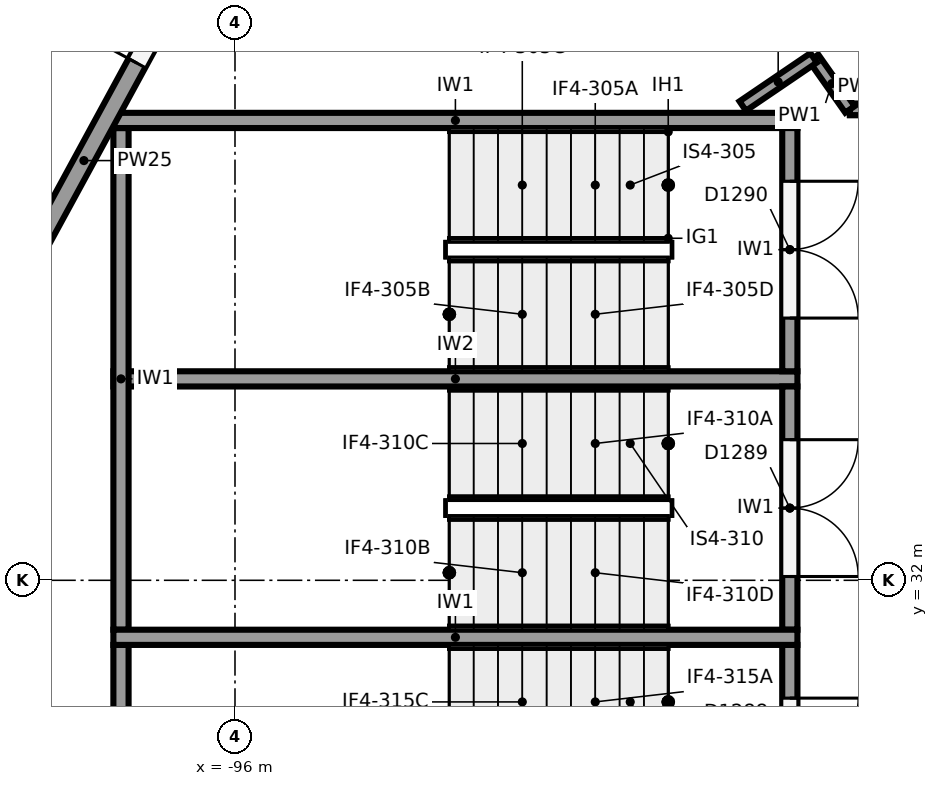
"""IFC4 building model, lengths in metres.
Left out: names, types, materials, properties, quantities, classifications, styles, units other than length and angle.
Written with IfcOpenShell. Run it as: python <this file> out.ifc"""

import sys

from ifc_helpers import new_model, si_unit, direction, frame, frame_2d, origin, place, context, subcontext, project, spatial, rectangle, extrude, element, fill, save


model = new_model("IFC4")
c1 = context("Model", 3, precision=1e-05, world=origin(), true_north=direction((0.0, 1.0)))
c2 = subcontext(c1, "Body", "Model", "MODEL_VIEW")
j1 = project(units=[si_unit("LENGTHUNIT", "METRE"), si_unit("PLANEANGLEUNIT", "RADIAN")], contexts=[c1])
p1 = place(None, origin())
s1 = spatial("IfcSite", under=j1, at=p1, CompositionType="ELEMENT")
p2 = place(p1, origin())
s2 = spatial("IfcBuilding", under=s1, at=p2, CompositionType="ELEMENT")
p3 = place(p2, frame((0.0, 0.0, 18.0)))
s3 = spatial("IfcBuildingStorey", under=s2, at=p3, CompositionType="ELEMENT", Elevation=18.0)
p4 = place(p3, frame((-101.161, 31.689, 0.0), z_axis=(0.0, 0.0, 1.0), x_axis=(0.477867771117, 0.878431780691, 0.0)))
e1 = element("IfcWall", 1, at=p4, inside=s3, PredefinedType="SOLIDWALL", context=c2, shape_type="SweptSolid", body=[
    extrude(rectangle(XDim=13.28, YDim=0.25, at=frame_2d((6.64, 0.0))), origin(), (0.0, 0.0, 1.0), 4.3),
])
p5 = place(p4, frame((11.63, 0.0, 1.0)))
e2 = element("IfcOpeningElement", 2, at=p5, cuts=e1, PredefinedType="OPENING", context=c2, shape_type="SweptSolid", body=[
    extrude(rectangle(XDim=0.9, YDim=3.25, at=frame_2d((0.45, 1.625))), frame((0.0, 0.135, 0.0), z_axis=(0.0, -1.0, 0.0), x_axis=(1.0, 0.0, 0.0)), (0.0, 0.0, 1.0), 0.27),
])
p6 = place(p4, frame((10.2, 0.0, 1.0)))
e3 = element("IfcOpeningElement", 3, at=p6, cuts=e1, PredefinedType="OPENING", context=c2, shape_type="SweptSolid", body=[
    extrude(rectangle(XDim=0.9, YDim=3.25, at=frame_2d((0.45, 1.625))), frame((0.0, 0.135, 0.0), z_axis=(0.0, -1.0, 0.0), x_axis=(1.0, 0.0, 0.0)), (0.0, 0.0, 1.0), 0.27),
])
p7 = place(p4, frame((1.13, 0.0, 1.0)))
e4 = element("IfcOpeningElement", 4, at=p7, cuts=e1, PredefinedType="OPENING", context=c2, shape_type="SweptSolid", body=[
    extrude(rectangle(XDim=0.9, YDim=3.25, at=frame_2d((0.45, 1.625))), frame((0.0, 0.135, 0.0), z_axis=(0.0, -1.0, 0.0), x_axis=(1.0, 0.0, 0.0)), (0.0, 0.0, 1.0), 0.27),
])
p8 = place(p4, frame((8.1, 0.0, 0.0)))
e5 = element("IfcOpeningElement", 5, at=p8, cuts=e1, PredefinedType="OPENING", context=c2, shape_type="SweptSolid", body=[
    extrude(rectangle(XDim=1.8, YDim=2.4, at=frame_2d((0.9, 1.2))), frame((0.0, 0.135, 0.0), z_axis=(0.0, -1.0, 0.0), x_axis=(1.0, 0.0, 0.0)), (0.0, 0.0, 1.0), 0.27),
])
p9 = place(p3, frame((-94.815, 19.145, 0.0), z_axis=(0.0, 0.0, 1.0), x_axis=(-0.477867771117, 0.878431780691, 0.0)))
e6 = element("IfcWall", 6, at=p9, inside=s3, PredefinedType="SOLIDWALL", context=c2, shape_type="SweptSolid", body=[
    extrude(rectangle(XDim=13.28, YDim=0.25, at=frame_2d((6.64, 0.0))), origin(), (0.0, 0.0, 1.0), 4.3),
])
p10 = place(p9, frame((0.75, 0.0, 1.0)))
e7 = element("IfcOpeningElement", 7, at=p10, cuts=e6, PredefinedType="OPENING", context=c2, shape_type="SweptSolid", body=[
    extrude(rectangle(XDim=0.9, YDim=3.25, at=frame_2d((0.45, 1.625))), frame((0.0, 0.135, 0.0), z_axis=(0.0, -1.0, 0.0), x_axis=(1.0, 0.0, 0.0)), (0.0, 0.0, 1.0), 0.27),
])
p11 = place(p9, frame((2.85, 0.0, 1.0)))
e8 = element("IfcOpeningElement", 8, at=p11, cuts=e6, PredefinedType="OPENING", context=c2, shape_type="SweptSolid", body=[
    extrude(rectangle(XDim=0.9, YDim=3.25, at=frame_2d((0.45, 1.625))), frame((0.0, 0.135, 0.0), z_axis=(0.0, -1.0, 0.0), x_axis=(1.0, 0.0, 0.0)), (0.0, 0.0, 1.0), 0.27),
])
p12 = place(p9, frame((11.25, 0.0, 1.0)))
e9 = element("IfcOpeningElement", 9, at=p12, cuts=e6, PredefinedType="OPENING", context=c2, shape_type="SweptSolid", body=[
    extrude(rectangle(XDim=0.9, YDim=3.25, at=frame_2d((0.45, 1.625))), frame((0.0, 0.135, 0.0), z_axis=(0.0, -1.0, 0.0), x_axis=(1.0, 0.0, 0.0)), (0.0, 0.0, 1.0), 0.27),
])
for number, where, z_axis, x_axis in (
    (10, (-97.6, 38.05, 0.0), (0.0, 0.0, 1.0), (1.0, 0.0, 0.0)),
    (11, (-97.6, 31.25, 0.0), (0.0, 0.0, 1.0), (1.0, 0.0, 0.0)),
):
    element("IfcWall", number, at=place(p3, frame(where, z_axis=z_axis, x_axis=x_axis)), inside=s3, PredefinedType="SHEAR", context=c2, shape_type="SweptSolid", body=[
        extrude(rectangle(XDim=9.0, YDim=0.2, at=frame_2d((4.5, 0.0))), origin(), (0.0, 0.0, 1.0), 5.6),
    ])
for number, where, z_axis, x_axis in (
    (12, (-97.5, 37.95, 0.0), (0.0, 0.0, 1.0), (0.0, -1.0, 0.0)),
    (13, (-97.5, 31.15, 0.0), (0.0, 0.0, 1.0), (0.0, -1.0, 0.0)),
):
    element("IfcWall", number, at=place(p3, frame(where, z_axis=z_axis, x_axis=x_axis)), inside=s3, PredefinedType="SHEAR", context=c2, shape_type="SweptSolid", body=[
        extrude(rectangle(XDim=6.6, YDim=0.2, at=frame_2d((3.3, 0.0))), origin(), (0.0, 0.0, 1.0), 5.6),
    ])
p13 = place(p3, frame((-97.6, 34.65, 0.0), z_axis=(0.0, 0.0, 1.0), x_axis=(1.0, 0.0, 0.0)))
e14 = element("IfcWall", 14, at=p13, inside=s3, PredefinedType="SHEAR", context=c2, shape_type="SweptSolid", body=[
    extrude(rectangle(XDim=9.0, YDim=0.2, at=frame_2d((4.5, 0.0))), origin(), (0.0, 0.0, 1.0), 5.6),
])
p14 = place(p3, frame((-88.7, 37.95, 0.0), z_axis=(0.0, 0.0, 1.0), x_axis=(0.0, -1.0, 0.0)))
e15 = element("IfcWall", 15, at=p14, inside=s3, PredefinedType="SHEAR", context=c2, shape_type="SweptSolid", body=[
    extrude(rectangle(XDim=3.2, YDim=0.2, at=frame_2d((1.6, 0.0))), origin(), (0.0, 0.0, 1.0), 5.6),
])
p15 = place(p14, frame((0.7, 0.0, 0.0)))
e16 = element("IfcOpeningElement", 16, at=p15, cuts=e15, PredefinedType="OPENING", context=c2, shape_type="SweptSolid", body=[
    extrude(rectangle(XDim=1.8, YDim=2.1, at=frame_2d((0.9, 1.05))), frame((0.0, 0.11, 0.0), z_axis=(0.0, -1.0, 0.0), x_axis=(1.0, 0.0, 0.0)), (0.0, 0.0, 1.0), 0.22),
])
p16 = place(p3, frame((-88.7, 34.55, 0.0), z_axis=(0.0, 0.0, 1.0), x_axis=(0.0, -1.0, 0.0)))
e17 = element("IfcWall", 17, at=p16, inside=s3, PredefinedType="SHEAR", context=c2, shape_type="SweptSolid", body=[
    extrude(rectangle(XDim=3.2, YDim=0.2, at=frame_2d((1.6, 0.0))), origin(), (0.0, 0.0, 1.0), 5.6),
])
p17 = place(p16, frame((0.7, 0.0, 0.0)))
e18 = element("IfcOpeningElement", 18, at=p17, cuts=e17, PredefinedType="OPENING", context=c2, shape_type="SweptSolid", body=[
    extrude(rectangle(XDim=1.8, YDim=2.1, at=frame_2d((0.9, 1.05))), frame((0.0, 0.11, 0.0), z_axis=(0.0, -1.0, 0.0), x_axis=(1.0, 0.0, 0.0)), (0.0, 0.0, 1.0), 0.22),
])
p18 = place(p3, frame((-88.7, 31.15, 0.0), z_axis=(0.0, 0.0, 1.0), x_axis=(0.0, -1.0, 0.0)))
e19 = element("IfcWall", 19, at=p18, inside=s3, PredefinedType="SHEAR", context=c2, shape_type="SweptSolid", body=[
    extrude(rectangle(XDim=3.2, YDim=0.2, at=frame_2d((1.6, 0.0))), origin(), (0.0, 0.0, 1.0), 5.6),
])
p19 = place(p18, frame((0.7, 0.0, 0.0)))
e20 = element("IfcOpeningElement", 20, at=p19, cuts=e19, PredefinedType="OPENING", context=c2, shape_type="SweptSolid", body=[
    extrude(rectangle(XDim=1.8, YDim=2.1, at=frame_2d((0.9, 1.05))), frame((0.0, 0.11, 0.0), z_axis=(0.0, -1.0, 0.0), x_axis=(1.0, 0.0, 0.0)), (0.0, 0.0, 1.0), 0.22),
])
p20 = place(p3, frame((-81.555, 38.195, 0.0), z_axis=(0.0, 0.0, 1.0), x_axis=(-1.0, 0.0, 0.0)))
e21 = element("IfcWall", 21, at=p20, inside=s3, PredefinedType="PARTITIONING", context=c2, shape_type="SweptSolid", body=[
    extrude(rectangle(XDim=6.354, YDim=0.15, at=frame_2d((3.177, 0.0))), origin(), (0.0, 0.0, 1.0), 4.3),
])
p21 = place(p20, frame((3.85, 0.0, 0.0)))
e22 = element("IfcOpeningElement", 22, at=p21, cuts=e21, PredefinedType="OPENING", context=c2, shape_type="SweptSolid", body=[
    extrude(rectangle(XDim=1.8, YDim=2.1, at=frame_2d((0.9, 1.05))), frame((0.0, 0.085, 0.0), z_axis=(0.0, -1.0, 0.0), x_axis=(1.0, 0.0, 0.0)), (0.0, 0.0, 1.0), 0.17),
])
p22 = place(p3, frame((-87.255, 38.195, 4.3), z_axis=(0.0, 0.0, 1.0), x_axis=(-1.0, 0.0, 0.0)))
e23 = element("IfcWall", 23, at=p22, inside=s3, PredefinedType="PARTITIONING", context=c2, shape_type="SweptSolid", body=[
    extrude(rectangle(XDim=0.654, YDim=0.15, at=frame_2d((0.327, 0.0))), origin(), (0.0, 0.0, 1.0), 1.3),
])
p23 = place(p3, frame((-87.909, 38.195, 0.0), z_axis=(0.0, 0.0, 1.0), x_axis=(-0.575573582652, 0.81774999294, 0.0)))
e24 = element("IfcWall", 24, at=p23, inside=s3, PredefinedType="PARTITIONING", context=c2, shape_type="SweptSolid", body=[
    extrude(rectangle(XDim=0.83, YDim=0.15, at=frame_2d((0.415, 0.0))), origin(), (0.0, 0.0, 1.0), 5.6),
])
p24 = place(p3, frame((-88.387, 38.874, 0.0), z_axis=(0.0, 0.0, 1.0), x_axis=(-0.827055308354, -0.562120553728, 0.0)))
e25 = element("IfcWall", 25, at=p24, inside=s3, PredefinedType="PARTITIONING", context=c2, shape_type="SweptSolid", body=[
    extrude(rectangle(XDim=1.128, YDim=0.15, at=frame_2d((0.564, 0.0))), origin(), (0.0, 0.0, 1.0), 5.6),
])
p25 = place(p15, origin())
e26 = element("IfcDoor", 26, at=p25, inside=s3, OperationType="DOUBLE_DOOR_SINGLE_SWING", PredefinedType="DOOR", context=c2, shape_type="SweptSolid", body=[
    extrude(rectangle(XDim=1.8, YDim=2.1, at=frame_2d((0.9, 1.05))), frame((0.0, 0.025, 0.0), z_axis=(0.0, -1.0, 0.0), x_axis=(1.0, 0.0, 0.0)), (0.0, 0.0, 1.0), 0.05),
])
fill(e16, e26)
p26 = place(p17, origin())
e27 = element("IfcDoor", 27, at=p26, inside=s3, OperationType="DOUBLE_DOOR_SINGLE_SWING", PredefinedType="DOOR", context=c2, shape_type="SweptSolid", body=[
    extrude(rectangle(XDim=1.8, YDim=2.1, at=frame_2d((0.9, 1.05))), frame((0.0, 0.025, 0.0), z_axis=(0.0, -1.0, 0.0), x_axis=(1.0, 0.0, 0.0)), (0.0, 0.0, 1.0), 0.05),
])
fill(e18, e27)
p27 = place(p19, origin())
e28 = element("IfcDoor", 28, at=p27, inside=s3, OperationType="DOUBLE_DOOR_SINGLE_SWING", PredefinedType="DOOR", context=c2, shape_type="SweptSolid", body=[
    extrude(rectangle(XDim=1.8, YDim=2.1, at=frame_2d((0.9, 1.05))), frame((0.0, 0.025, 0.0), z_axis=(0.0, -1.0, 0.0), x_axis=(1.0, 0.0, 0.0)), (0.0, 0.0, 1.0), 0.05),
])
fill(e20, e28)
p28 = place(p8, origin())
e29 = element("IfcDoor", 29, at=p28, inside=s3, OperationType="DOUBLE_DOOR_SINGLE_SWING", PredefinedType="DOOR", context=c2, shape_type="SweptSolid", body=[
    extrude(rectangle(XDim=1.8, YDim=2.4, at=frame_2d((0.9, 1.2))), frame((0.0, 0.025, 0.0), z_axis=(0.0, -1.0, 0.0), x_axis=(1.0, 0.0, 0.0)), (0.0, 0.0, 1.0), 0.05),
])
fill(e5, e29)
save(model, sys.argv[1])
